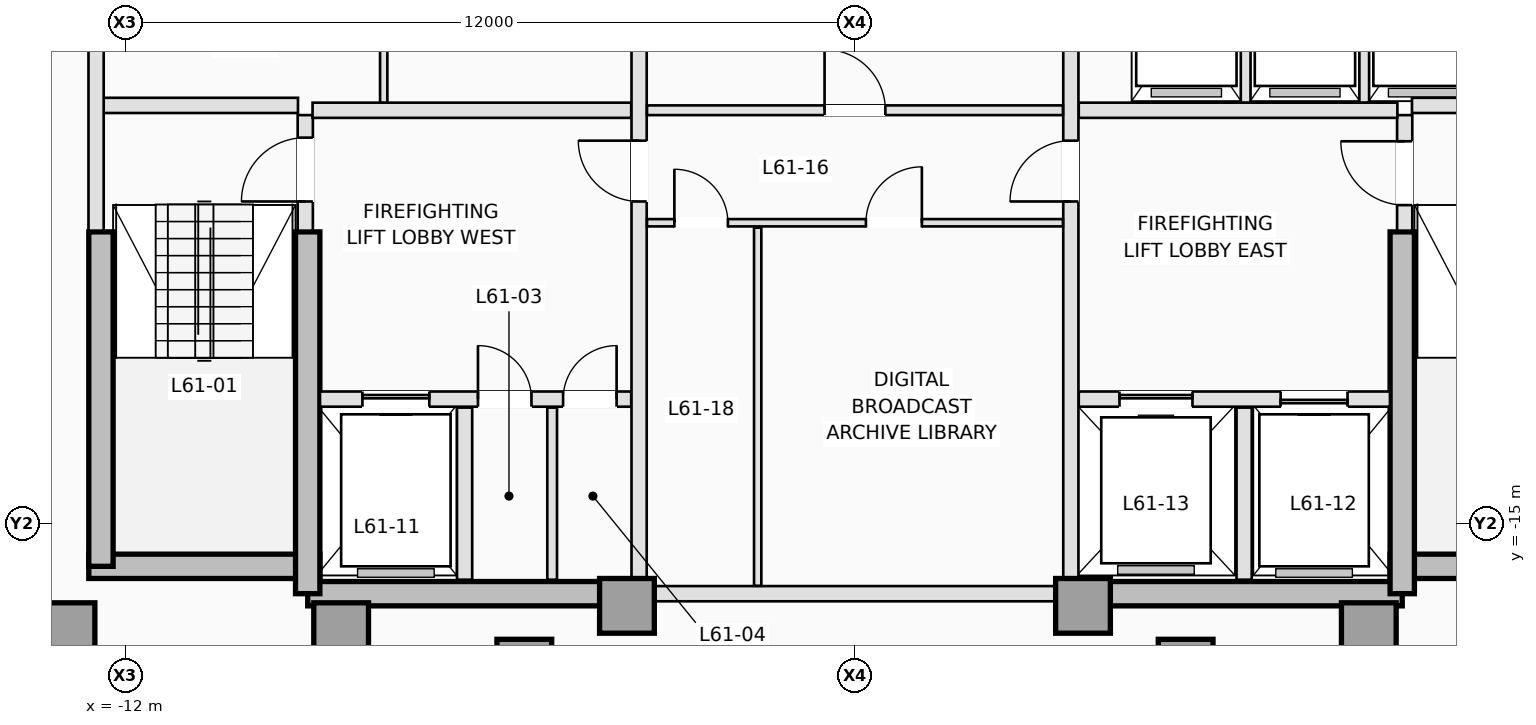
"""IFC4 building model, lengths in metres.
Left out: names, types, materials, properties, quantities, classifications, styles, units other than length and angle.
Written with IfcOpenShell. Run it as: python <this file> out.ifc"""

import sys

from ifc_helpers import new_model, si_unit, direction, frame, frame_2d, origin, origin_2d, place, context, subcontext, project, spatial, rectangle, extrude, element, fill, save


model = new_model("IFC4")
c1 = context("Model", 3, precision=1e-05, world=origin(), true_north=direction((0.0, 1.0)))
c2 = subcontext(c1, "Body", "Model", "MODEL_VIEW")
j1 = project(units=[si_unit("LENGTHUNIT", "METRE"), si_unit("PLANEANGLEUNIT", "RADIAN")], contexts=[c1])
p1 = place(None, origin())
s1 = spatial("IfcSite", under=j1, at=p1, CompositionType="ELEMENT")
p2 = place(p1, origin())
s2 = spatial("IfcBuilding", under=s1, at=p2, CompositionType="ELEMENT")
p3 = place(p2, frame((0.0, 0.0, 221.9)))
s3 = spatial("IfcBuildingStorey", under=s2, at=p3, CompositionType="ELEMENT", Elevation=221.9)
p4 = place(p3, frame((-12.6, -15.7, 0.0), z_axis=(0.0, 0.0, 1.0), x_axis=(1.0, 0.0, 0.0)))
e1 = element("IfcWall", 1, at=p4, inside=s3, PredefinedType="SHEAR", context=c2, shape_type="SweptSolid", body=[
    extrude(rectangle(XDim=3.8, YDim=0.4, at=frame_2d((1.9, 0.0))), origin(), (0.0, 0.0, 1.0), 3.5),
])
for number, where, z_axis, x_axis in (
    (2, (-9.0, -16.15, 0.0), (0.0, 0.0, 1.0), (1.0, 0.0, 0.0)),
    (3, (3.75, -16.15, 0.0), (0.0, 0.0, 1.0), (1.0, 0.0, 0.0)),
):
    element("IfcWall", number, at=place(p3, frame(where, z_axis=z_axis, x_axis=x_axis)), inside=s3, PredefinedType="SHEAR", context=c2, shape_type="SweptSolid", body=[
        extrude(rectangle(XDim=5.25, YDim=0.4, at=frame_2d((2.625, 0.0))), origin(), (0.0, 0.0, 1.0), 3.5),
    ])
p5 = place(p3, frame((8.8, -15.7, 0.0), z_axis=(0.0, 0.0, 1.0), x_axis=(1.0, 0.0, 0.0)))
e4 = element("IfcWall", 4, at=p5, inside=s3, PredefinedType="SHEAR", context=c2, shape_type="SweptSolid", body=[
    extrude(rectangle(XDim=3.8, YDim=0.4, at=frame_2d((1.9, 0.0))), origin(), (0.0, 0.0, 1.0), 3.5),
])
p6 = place(p3, frame((-12.4, -15.7, 0.0), z_axis=(0.0, 0.0, 1.0), x_axis=(0.0, 1.0, 0.0)))
e5 = element("IfcWall", 5, at=p6, inside=s3, PredefinedType="SHEAR", context=c2, shape_type="SweptSolid", body=[
    extrude(rectangle(XDim=5.5, YDim=0.4, at=frame_2d((2.75, 0.0))), origin(), (0.0, 0.0, 1.0), 3.5),
])
for number, where, z_axis, x_axis in (
    (6, (-9.0, -16.15, 0.0), (0.0, 0.0, 1.0), (0.0, 1.0, 0.0)),
    (7, (9.0, -16.15, 0.0), (0.0, 0.0, 1.0), (0.0, 1.0, 0.0)),
):
    element("IfcWall", number, at=place(p3, frame(where, z_axis=z_axis, x_axis=x_axis)), inside=s3, PredefinedType="SHEAR", context=c2, shape_type="SweptSolid", body=[
        extrude(rectangle(XDim=5.95, YDim=0.4, at=frame_2d((2.975, 0.0))), origin(), (0.0, 0.0, 1.0), 3.5),
    ])
for number, where, z_axis, x_axis in (
    (8, (-12.95, -16.75, 0.0), (0.0, 0.0, 1.0), (1.0, 0.0, 0.0)),
    (9, (-8.45, -16.75, 0.0), (0.0, 0.0, 1.0), (1.0, 0.0, 0.0)),
    (10, (-3.75, -16.35, 0.0), (0.0, 0.0, 1.0), (1.0, 0.0, 0.0)),
    (11, (3.75, -16.35, 0.0), (0.0, 0.0, 1.0), (1.0, 0.0, 0.0)),
    (12, (8.45, -16.75, 0.0), (0.0, 0.0, 1.0), (1.0, 0.0, 0.0)),
    (13, (-5.438, -17.35, 0.0), (0.0, 0.0, 1.0), (0.0, 1.0, 0.0)),
    (14, (5.438, -17.35, 0.0), (0.0, 0.0, 1.0), (0.0, 1.0, 0.0)),
):
    element("IfcColumn", number, at=place(p3, frame(where, z_axis=z_axis, x_axis=x_axis)), inside=s3, PredefinedType="COLUMN", context=c2, shape_type="SweptSolid", body=[
        extrude(rectangle(XDim=0.9, YDim=0.9, at=origin_2d()), origin(), (0.0, 0.0, 1.0), 3.5),
    ])
p7 = place(p3, frame((-9.04, -10.18, 0.0), z_axis=(0.0, 0.0, 1.0), x_axis=(0.0, 1.0, 0.0)))
e15 = element("IfcWall", 15, at=p7, inside=s3, PredefinedType="PARTITIONING", context=c2, shape_type="SweptSolid", body=[
    extrude(rectangle(XDim=1.9, YDim=0.25, at=frame_2d((0.95, 0.0))), origin(), (0.0, 0.0, 1.0), 3.25),
])
p8 = place(p7, frame((0.48, 0.0, 0.0)))
e16 = element("IfcOpeningElement", 16, at=p8, cuts=e15, PredefinedType="OPENING", context=c2, shape_type="SweptSolid", body=[
    extrude(rectangle(XDim=1.05, YDim=2.15, at=frame_2d((0.525, 1.075))), frame((0.0, 0.135, 0.0), z_axis=(0.0, -1.0, 0.0), x_axis=(1.0, 0.0, 0.0)), (0.0, 0.0, 1.0), 0.27),
])
p9 = place(p3, frame((9.04, -10.18, 0.0), z_axis=(0.0, 0.0, 1.0), x_axis=(0.0, 1.0, 0.0)))
e17 = element("IfcWall", 17, at=p9, inside=s3, PredefinedType="PARTITIONING", context=c2, shape_type="SweptSolid", body=[
    extrude(rectangle(XDim=1.9, YDim=0.25, at=frame_2d((0.95, 0.0))), origin(), (0.0, 0.0, 1.0), 3.25),
])
p10 = place(p9, frame((0.42, 0.0, 0.0)))
e18 = element("IfcOpeningElement", 18, at=p10, cuts=e17, PredefinedType="OPENING", context=c2, shape_type="SweptSolid", body=[
    extrude(rectangle(XDim=1.05, YDim=2.15, at=frame_2d((0.525, 1.075))), frame((0.0, 0.135, 0.0), z_axis=(0.0, -1.0, 0.0), x_axis=(1.0, 0.0, 0.0)), (0.0, 0.0, 1.0), 0.27),
])
for number, where, z_axis, x_axis in (
    (19, (-12.38, -8.12, 0.0), (0.0, 0.0, 1.0), (1.0, 0.0, 0.0)),
    (20, (9.16, -8.12, 0.0), (0.0, 0.0, 1.0), (1.0, 0.0, 0.0)),
):
    element("IfcWall", number, at=place(p3, frame(where, z_axis=z_axis, x_axis=x_axis)), inside=s3, PredefinedType="PARTITIONING", context=c2, shape_type="SweptSolid", body=[
        extrude(rectangle(XDim=3.22, YDim=0.25, at=frame_2d((1.61, 0.0))), origin(), (0.0, 0.0, 1.0), 3.25),
    ])
p11 = place(p3, frame((-12.48, -10.18, 0.0), z_axis=(0.0, 0.0, 1.0), x_axis=(0.0, 1.0, 0.0)))
e21 = element("IfcWall", 21, at=p11, inside=s3, PredefinedType="PARTITIONING", context=c2, shape_type="SweptSolid", body=[
    extrude(rectangle(XDim=4.84, YDim=0.25, at=frame_2d((2.42, 0.0))), origin(), (0.0, 0.0, 1.0), 3.25),
])
p12 = place(p3, frame((-8.798, -12.95, 0.0), z_axis=(0.0, 0.0, 1.0), x_axis=(1.0, 0.0, 0.0)))
e22 = element("IfcWall", 22, at=p12, inside=s3, PredefinedType="PARTITIONING", context=c2, shape_type="SweptSolid", body=[
    extrude(rectangle(XDim=5.118, YDim=0.25, at=frame_2d((2.559, 0.0))), origin(), (0.0, 0.0, 1.0), 3.25),
])
p13 = place(p12, frame((0.698, 0.0, 0.0)))
e23 = element("IfcOpeningElement", 23, at=p13, cuts=e22, PredefinedType="OPENING", context=c2, shape_type="SweptSolid", body=[
    extrude(rectangle(XDim=1.1, YDim=2.15, at=frame_2d((0.55, 1.075))), frame((0.0, 0.135, 0.0), z_axis=(0.0, -1.0, 0.0), x_axis=(1.0, 0.0, 0.0)), (0.0, 0.0, 1.0), 0.27),
])
p14 = place(p12, frame((2.598, 0.0, 0.0)))
e24 = element("IfcOpeningElement", 24, at=p14, cuts=e22, PredefinedType="OPENING", context=c2, shape_type="SweptSolid", body=[
    extrude(rectangle(XDim=0.88, YDim=2.1, at=frame_2d((0.44, 1.05))), frame((0.0, 0.135, 0.0), z_axis=(0.0, -1.0, 0.0), x_axis=(1.0, 0.0, 0.0)), (0.0, 0.0, 1.0), 0.27),
])
p15 = place(p12, frame((3.998, 0.0, 0.0)))
e25 = element("IfcOpeningElement", 25, at=p15, cuts=e22, PredefinedType="OPENING", context=c2, shape_type="SweptSolid", body=[
    extrude(rectangle(XDim=0.88, YDim=2.1, at=frame_2d((0.44, 1.05))), frame((0.0, 0.135, 0.0), z_axis=(0.0, -1.0, 0.0), x_axis=(1.0, 0.0, 0.0)), (0.0, 0.0, 1.0), 0.27),
])
p16 = place(p3, frame((3.68, -12.95, 0.0), z_axis=(0.0, 0.0, 1.0), x_axis=(1.0, 0.0, 0.0)))
e26 = element("IfcWall", 26, at=p16, inside=s3, PredefinedType="PARTITIONING", context=c2, shape_type="SweptSolid", body=[
    extrude(rectangle(XDim=5.118, YDim=0.25, at=frame_2d((2.559, 0.0))), origin(), (0.0, 0.0, 1.0), 3.25),
])
p17 = place(p16, frame((3.32, 0.0, 0.0)))
e27 = element("IfcOpeningElement", 27, at=p17, cuts=e26, PredefinedType="OPENING", context=c2, shape_type="SweptSolid", body=[
    extrude(rectangle(XDim=1.1, YDim=2.15, at=frame_2d((0.55, 1.075))), frame((0.0, 0.135, 0.0), z_axis=(0.0, -1.0, 0.0), x_axis=(1.0, 0.0, 0.0)), (0.0, 0.0, 1.0), 0.27),
])
p18 = place(p16, frame((0.67, 0.0, 0.0)))
e28 = element("IfcOpeningElement", 28, at=p18, cuts=e26, PredefinedType="OPENING", context=c2, shape_type="SweptSolid", body=[
    extrude(rectangle(XDim=1.2, YDim=2.15, at=frame_2d((0.6, 1.075))), frame((0.0, 0.135, 0.0), z_axis=(0.0, -1.0, 0.0), x_axis=(1.0, 0.0, 0.0)), (0.0, 0.0, 1.0), 0.27),
])
p19 = place(p3, frame((-6.42, -15.92, 0.0), z_axis=(0.0, 0.0, 1.0), x_axis=(0.0, 1.0, 0.0)))
e29 = element("IfcWall", 29, at=p19, inside=s3, PredefinedType="PARTITIONING", context=c2, shape_type="SweptSolid", body=[
    extrude(rectangle(XDim=2.83, YDim=0.25, at=frame_2d((1.415, 0.0))), origin(), (0.0, 0.0, 1.0), 3.25),
])
p20 = place(p3, frame((-4.98, -15.92, 0.0), z_axis=(0.0, 0.0, 1.0), x_axis=(0.0, 1.0, 0.0)))
e30 = element("IfcWall", 30, at=p20, inside=s3, PredefinedType="PARTITIONING", context=c2, shape_type="SweptSolid", body=[
    extrude(rectangle(XDim=2.83, YDim=0.16, at=frame_2d((1.415, 0.0))), origin(), (0.0, 0.0, 1.0), 3.25),
])
p21 = place(p3, frame((6.4, -15.92, 0.0), z_axis=(0.0, 0.0, 1.0), x_axis=(0.0, 1.0, 0.0)))
e31 = element("IfcWall", 31, at=p21, inside=s3, PredefinedType="PARTITIONING", context=c2, shape_type="SweptSolid", body=[
    extrude(rectangle(XDim=2.83, YDim=0.25, at=frame_2d((1.415, 0.0))), origin(), (0.0, 0.0, 1.0), 3.25),
])
for number, where, z_axis, x_axis in (
    (32, (-8.92, -8.2, 0.0), (0.0, 0.0, 1.0), (1.0, 0.0, 0.0)),
    (33, (3.68, -8.2, 0.0), (0.0, 0.0, 1.0), (1.0, 0.0, 0.0)),
):
    element("IfcWall", number, at=place(p3, frame(where, z_axis=z_axis, x_axis=x_axis)), inside=s3, PredefinedType="PARTITIONING", context=c2, shape_type="SweptSolid", body=[
        extrude(rectangle(XDim=5.24, YDim=0.25, at=frame_2d((2.62, 0.0))), origin(), (0.0, 0.0, 1.0), 3.25),
    ])
p22 = place(p3, frame((-3.55, -15.898, 0.0), z_axis=(0.0, 0.0, 1.0), x_axis=(0.0, 1.0, 0.0)))
e34 = element("IfcWall", 34, at=p22, inside=s3, PredefinedType="PARTITIONING", context=c2, shape_type="SweptSolid", body=[
    extrude(rectangle(XDim=10.558, YDim=0.25, at=frame_2d((5.279, 0.0))), origin(), (0.0, 0.0, 1.0), 3.25),
])
p23 = place(p22, frame((6.198, 0.0, 0.0)))
e35 = element("IfcOpeningElement", 35, at=p23, cuts=e34, PredefinedType="OPENING", context=c2, shape_type="SweptSolid", body=[
    extrude(rectangle(XDim=1.0, YDim=2.15, at=frame_2d((0.5, 1.075))), frame((0.0, 0.135, 0.0), z_axis=(0.0, -1.0, 0.0), x_axis=(1.0, 0.0, 0.0)), (0.0, 0.0, 1.0), 0.27),
])
p24 = place(p3, frame((3.55, -15.898, 0.0), z_axis=(0.0, 0.0, 1.0), x_axis=(0.0, 1.0, 0.0)))
e36 = element("IfcWall", 36, at=p24, inside=s3, PredefinedType="PARTITIONING", context=c2, shape_type="SweptSolid", body=[
    extrude(rectangle(XDim=10.558, YDim=0.25, at=frame_2d((5.279, 0.0))), origin(), (0.0, 0.0, 1.0), 3.25),
])
p25 = place(p24, frame((6.198, 0.0, 0.0)))
e37 = element("IfcOpeningElement", 37, at=p25, cuts=e36, PredefinedType="OPENING", context=c2, shape_type="SweptSolid", body=[
    extrude(rectangle(XDim=1.0, YDim=2.15, at=frame_2d((0.5, 1.075))), frame((0.0, 0.135, 0.0), z_axis=(0.0, -1.0, 0.0), x_axis=(1.0, 0.0, 0.0)), (0.0, 0.0, 1.0), 0.27),
])
p26 = place(p3, frame((-7.75, -8.073, 0.0), z_axis=(0.0, 0.0, 1.0), x_axis=(0.0, 1.0, 0.0)))
e38 = element("IfcWall", 38, at=p26, inside=s3, PredefinedType="PARTITIONING", context=c2, shape_type="SweptSolid", body=[
    extrude(rectangle(XDim=2.733, YDim=0.12, at=frame_2d((1.366, 0.0))), origin(), (0.0, 0.0, 1.0), 3.25),
])
for number, where, z_axis, x_axis in (
    (39, (6.425, -8.073, 0.0), (0.0, 0.0, 1.0), (0.0, 1.0, 0.0)),
    (40, (8.375, -8.073, 0.0), (0.0, 0.0, 1.0), (0.0, 1.0, 0.0)),
):
    element("IfcWall", number, at=place(p3, frame(where, z_axis=z_axis, x_axis=x_axis)), inside=s3, PredefinedType="PARTITIONING", context=c2, shape_type="SweptSolid", body=[
        extrude(rectangle(XDim=2.733, YDim=0.16, at=frame_2d((1.366, 0.0))), origin(), (0.0, 0.0, 1.0), 3.25),
    ])
p27 = place(p3, frame((-3.298, -16.15, 0.0), z_axis=(0.0, 0.0, 1.0), x_axis=(1.0, 0.0, 0.0)))
e41 = element("IfcWall", 41, at=p27, inside=s3, PredefinedType="PARTITIONING", context=c2, shape_type="SweptSolid", body=[
    extrude(rectangle(XDim=6.596, YDim=0.25, at=frame_2d((3.298, 0.0))), origin(), (0.0, 0.0, 1.0), 2.45),
])
p28 = place(p3, frame((-3.42, -8.2, 0.0), z_axis=(0.0, 0.0, 1.0), x_axis=(1.0, 0.0, 0.0)))
e42 = element("IfcWall", 42, at=p28, inside=s3, PredefinedType="PARTITIONING", context=c2, shape_type="SweptSolid", body=[
    extrude(rectangle(XDim=6.84, YDim=0.16, at=frame_2d((3.42, 0.0))), origin(), (0.0, 0.0, 1.0), 3.25),
])
p29 = place(p28, frame((2.92, 0.0, 0.0)))
e43 = element("IfcOpeningElement", 43, at=p29, cuts=e42, PredefinedType="OPENING", context=c2, shape_type="SweptSolid", body=[
    extrude(rectangle(XDim=1.0, YDim=2.15, at=frame_2d((0.5, 1.075))), frame((0.0, 0.09, 0.0), z_axis=(0.0, -1.0, 0.0), x_axis=(1.0, 0.0, 0.0)), (0.0, 0.0, 1.0), 0.18),
])
p30 = place(p3, frame((-3.42, -10.05, 0.0), z_axis=(0.0, 0.0, 1.0), x_axis=(1.0, 0.0, 0.0)))
e44 = element("IfcWall", 44, at=p30, inside=s3, PredefinedType="PARTITIONING", context=c2, shape_type="SweptSolid", body=[
    extrude(rectangle(XDim=6.84, YDim=0.12, at=frame_2d((3.42, 0.0))), origin(), (0.0, 0.0, 1.0), 3.25),
])
p31 = place(p30, frame((0.45, 0.0, 0.0)))
e45 = element("IfcOpeningElement", 45, at=p31, cuts=e44, PredefinedType="OPENING", context=c2, shape_type="SweptSolid", body=[
    extrude(rectangle(XDim=0.88, YDim=2.12, at=frame_2d((0.44, 1.06))), frame((0.0, 0.07, 0.0), z_axis=(0.0, -1.0, 0.0), x_axis=(1.0, 0.0, 0.0)), (0.0, 0.0, 1.0), 0.14),
])
p32 = place(p30, frame((3.6, 0.0, 0.0)))
e46 = element("IfcOpeningElement", 46, at=p32, cuts=e44, PredefinedType="OPENING", context=c2, shape_type="SweptSolid", body=[
    extrude(rectangle(XDim=0.92, YDim=2.12, at=frame_2d((0.46, 1.06))), frame((0.0, 0.07, 0.0), z_axis=(0.0, -1.0, 0.0), x_axis=(1.0, 0.0, 0.0)), (0.0, 0.0, 1.0), 0.14),
])
p33 = place(p3, frame((-1.6, -16.02, 0.0), z_axis=(0.0, 0.0, 1.0), x_axis=(0.0, 1.0, 0.0)))
e47 = element("IfcWall", 47, at=p33, inside=s3, PredefinedType="PARTITIONING", context=c2, shape_type="SweptSolid", body=[
    extrude(rectangle(XDim=5.89, YDim=0.12, at=frame_2d((2.945, 0.0))), origin(), (0.0, 0.0, 1.0), 3.25),
])
p34 = place(p13, origin())
e48 = element("IfcDoor", 48, at=p34, inside=s3, OperationType="SLIDING_TO_LEFT", PredefinedType="DOOR", context=c2, shape_type="SweptSolid", body=[
    extrude(rectangle(XDim=1.1, YDim=2.15, at=frame_2d((0.55, 1.075))), frame((0.0, 0.025, 0.0), z_axis=(0.0, -1.0, 0.0), x_axis=(1.0, 0.0, 0.0)), (0.0, 0.0, 1.0), 0.05),
])
fill(e23, e48)
p35 = place(p17, origin())
e49 = element("IfcDoor", 49, at=p35, inside=s3, OperationType="SLIDING_TO_RIGHT", PredefinedType="DOOR", context=c2, shape_type="SweptSolid", body=[
    extrude(rectangle(XDim=1.1, YDim=2.15, at=frame_2d((0.55, 1.075))), frame((0.0, 0.025, 0.0), z_axis=(0.0, -1.0, 0.0), x_axis=(1.0, 0.0, 0.0)), (0.0, 0.0, 1.0), 0.05),
])
fill(e27, e49)
p36 = place(p18, origin())
e50 = element("IfcDoor", 50, at=p36, inside=s3, OperationType="SLIDING_TO_LEFT", PredefinedType="DOOR", context=c2, shape_type="SweptSolid", body=[
    extrude(rectangle(XDim=1.2, YDim=2.15, at=frame_2d((0.6, 1.075))), frame((0.0, 0.025, 0.0), z_axis=(0.0, -1.0, 0.0), x_axis=(1.0, 0.0, 0.0)), (0.0, 0.0, 1.0), 0.05),
])
fill(e28, e50)
p37 = place(p8, origin())
e51 = element("IfcDoor", 51, at=p37, inside=s3, OperationType="SINGLE_SWING_LEFT", PredefinedType="DOOR", context=c2, shape_type="SweptSolid", body=[
    extrude(rectangle(XDim=1.05, YDim=2.15, at=frame_2d((0.525, 1.075))), frame((0.0, 0.025, 0.0), z_axis=(0.0, -1.0, 0.0), x_axis=(1.0, 0.0, 0.0)), (0.0, 0.0, 1.0), 0.05),
])
fill(e16, e51)
p38 = place(p10, origin())
e52 = element("IfcDoor", 52, at=p38, inside=s3, OperationType="SINGLE_SWING_RIGHT", PredefinedType="DOOR", context=c2, shape_type="SweptSolid", body=[
    extrude(rectangle(XDim=1.05, YDim=2.15, at=frame_2d((0.525, 1.075))), frame((0.0, 0.025, 0.0), z_axis=(0.0, -1.0, 0.0), x_axis=(1.0, 0.0, 0.0)), (0.0, 0.0, 1.0), 0.05),
])
fill(e18, e52)
p39 = place(p14, origin())
e53 = element("IfcDoor", 53, at=p39, inside=s3, OperationType="SINGLE_SWING_LEFT", PredefinedType="TRAPDOOR", context=c2, shape_type="SweptSolid", body=[
    extrude(rectangle(XDim=0.88, YDim=2.1, at=frame_2d((0.44, 1.05))), frame((0.0, 0.025, 0.0), z_axis=(0.0, -1.0, 0.0), x_axis=(1.0, 0.0, 0.0)), (0.0, 0.0, 1.0), 0.05),
])
fill(e24, e53)
p40 = place(p15, origin())
e54 = element("IfcDoor", 54, at=p40, inside=s3, OperationType="SINGLE_SWING_RIGHT", PredefinedType="TRAPDOOR", context=c2, shape_type="SweptSolid", body=[
    extrude(rectangle(XDim=0.88, YDim=2.1, at=frame_2d((0.44, 1.05))), frame((0.0, 0.025, 0.0), z_axis=(0.0, -1.0, 0.0), x_axis=(1.0, 0.0, 0.0)), (0.0, 0.0, 1.0), 0.05),
])
fill(e25, e54)
p41 = place(p23, origin())
e55 = element("IfcDoor", 55, at=p41, inside=s3, OperationType="SINGLE_SWING_RIGHT", PredefinedType="DOOR", context=c2, shape_type="SweptSolid", body=[
    extrude(rectangle(XDim=1.0, YDim=2.15, at=frame_2d((0.5, 1.075))), frame((0.0, 0.025, 0.0), z_axis=(0.0, -1.0, 0.0), x_axis=(1.0, 0.0, 0.0)), (0.0, 0.0, 1.0), 0.05),
])
fill(e35, e55)
p42 = place(p25, origin())
e56 = element("IfcDoor", 56, at=p42, inside=s3, OperationType="SINGLE_SWING_LEFT", PredefinedType="DOOR", context=c2, shape_type="SweptSolid", body=[
    extrude(rectangle(XDim=1.0, YDim=2.15, at=frame_2d((0.5, 1.075))), frame((0.0, 0.025, 0.0), z_axis=(0.0, -1.0, 0.0), x_axis=(1.0, 0.0, 0.0)), (0.0, 0.0, 1.0), 0.05),
])
fill(e37, e56)
p43 = place(p29, origin())
e57 = element("IfcDoor", 57, at=p43, inside=s3, OperationType="SINGLE_SWING_LEFT", PredefinedType="DOOR", context=c2, shape_type="SweptSolid", body=[
    extrude(rectangle(XDim=1.0, YDim=2.15, at=frame_2d((0.5, 1.075))), frame((0.0, 0.025, 0.0), z_axis=(0.0, -1.0, 0.0), x_axis=(1.0, 0.0, 0.0)), (0.0, 0.0, 1.0), 0.05),
])
fill(e43, e57)
p44 = place(p31, origin())
e58 = element("IfcDoor", 58, at=p44, inside=s3, OperationType="SINGLE_SWING_LEFT", PredefinedType="DOOR", context=c2, shape_type="SweptSolid", body=[
    extrude(rectangle(XDim=0.88, YDim=2.12, at=frame_2d((0.44, 1.06))), frame((0.0, 0.025, 0.0), z_axis=(0.0, -1.0, 0.0), x_axis=(1.0, 0.0, 0.0)), (0.0, 0.0, 1.0), 0.05),
])
fill(e45, e58)
p45 = place(p32, origin())
e59 = element("IfcDoor", 59, at=p45, inside=s3, OperationType="SINGLE_SWING_RIGHT", PredefinedType="DOOR", context=c2, shape_type="SweptSolid", body=[
    extrude(rectangle(XDim=0.92, YDim=2.12, at=frame_2d((0.46, 1.06))), frame((0.0, 0.025, 0.0), z_axis=(0.0, -1.0, 0.0), x_axis=(1.0, 0.0, 0.0)), (0.0, 0.0, 1.0), 0.05),
])
fill(e46, e59)
save(model, sys.argv[1])
